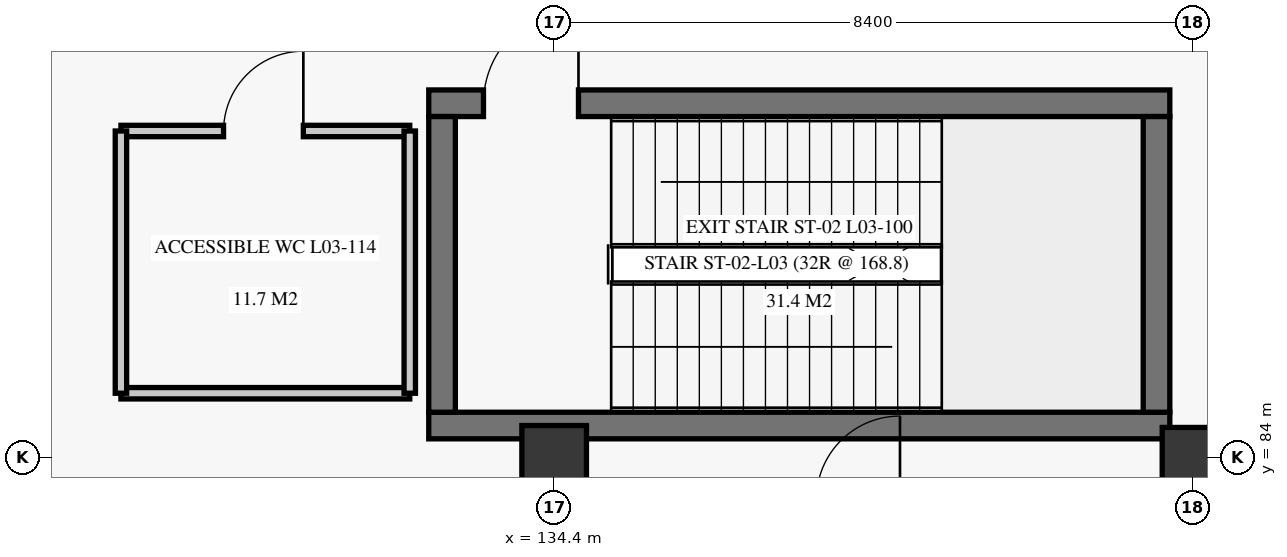
"""IFC4 building model, lengths in metres.
Left out: names, types, materials, properties, quantities, classifications, styles, units other than length and angle.
Written with IfcOpenShell. Run it as: python <this file> out.ifc"""

import sys

from ifc_helpers import new_model, si_unit, direction, frame, frame_2d, origin, origin_2d, place, context, subcontext, project, spatial, rectangle, extrude, element, fill, save


model = new_model("IFC4")
c1 = context("Model", 3, precision=1e-05, world=origin(), true_north=direction((0.0, 1.0)))
c2 = subcontext(c1, "Body", "Model", "MODEL_VIEW")
j1 = project(units=[si_unit("LENGTHUNIT", "METRE"), si_unit("PLANEANGLEUNIT", "RADIAN")], contexts=[c1])
p1 = place(None, origin())
s1 = spatial("IfcSite", under=j1, at=p1, CompositionType="ELEMENT")
p2 = place(p1, origin())
s2 = spatial("IfcBuilding", under=s1, at=p2, CompositionType="ELEMENT")
p3 = place(p2, frame((0.0, 0.0, 11.4)))
s3 = spatial("IfcBuildingStorey", under=s2, at=p3, CompositionType="ELEMENT", Elevation=11.4)
p4 = place(p3, frame((134.4, 84.0, 0.0), z_axis=(0.0, 0.0, 1.0), x_axis=(1.0, 0.0, 0.0)))
e1 = element("IfcColumn", 1, at=p4, inside=s3, PredefinedType="COLUMN", context=c2, shape_type="SweptSolid", body=[
    extrude(rectangle(XDim=0.85, YDim=0.85, at=origin_2d()), origin(), (0.0, 0.0, 1.0), 5.1),
])
p5 = place(p3, frame((142.8, 84.0, 0.0), z_axis=(0.0, 0.0, 1.0), x_axis=(1.0, 0.0, 0.0)))
e2 = element("IfcColumn", 2, at=p5, inside=s3, PredefinedType="COLUMN", context=c2, shape_type="SweptSolid", body=[
    extrude(rectangle(XDim=0.8, YDim=0.8, at=origin_2d()), origin(), (0.0, 0.0, 1.0), 5.1),
])
p6 = place(p3, frame((132.75, 84.425, 0.0), z_axis=(0.0, 0.0, 1.0), x_axis=(1.0, 0.0, 0.0)))
e3 = element("IfcWall", 3, at=p6, inside=s3, PredefinedType="SHEAR", context=c2, shape_type="SweptSolid", body=[
    extrude(rectangle(XDim=9.75, YDim=0.35, at=frame_2d((4.875, 0.0))), origin(), (0.0, 0.0, 1.0), 5.1),
])
p7 = place(p3, frame((132.75, 88.665, 0.0), z_axis=(0.0, 0.0, 1.0), x_axis=(1.0, 0.0, 0.0)))
e4 = element("IfcWall", 4, at=p7, inside=s3, PredefinedType="SHEAR", context=c2, shape_type="SweptSolid", body=[
    extrude(rectangle(XDim=9.75, YDim=0.35, at=frame_2d((4.875, 0.0))), origin(), (0.0, 0.0, 1.0), 5.1),
])
p8 = place(p7, frame((0.72, 0.0, 0.0)))
e5 = element("IfcOpeningElement", 5, at=p8, cuts=e4, PredefinedType="OPENING", context=c2, shape_type="SweptSolid", body=[
    extrude(rectangle(XDim=1.25, YDim=2.2, at=frame_2d((0.625, 1.1))), frame((0.0, 0.185, 0.0), z_axis=(0.0, -1.0, 0.0), x_axis=(1.0, 0.0, 0.0)), (0.0, 0.0, 1.0), 0.37),
])
for number, where, z_axis, x_axis in (
    (6, (132.925, 84.6, 0.0), (0.0, 0.0, 1.0), (0.0, 1.0, 0.0)),
    (7, (142.325, 84.6, 0.0), (0.0, 0.0, 1.0), (0.0, 1.0, 0.0)),
):
    element("IfcWall", number, at=place(p3, frame(where, z_axis=z_axis, x_axis=x_axis)), inside=s3, PredefinedType="SHEAR", context=c2, shape_type="SweptSolid", body=[
        extrude(rectangle(XDim=3.89, YDim=0.35, at=frame_2d((1.945, 0.0))), origin(), (0.0, 0.0, 1.0), 5.1),
    ])
p9 = place(p3, frame((128.7, 88.3, 0.0), z_axis=(0.0, 0.0, 1.0), x_axis=(1.0, 0.0, 0.0)))
e8 = element("IfcWall", 8, at=p9, inside=s3, PredefinedType="PARTITIONING", context=c2, shape_type="SweptSolid", body=[
    extrude(rectangle(XDim=3.8, YDim=0.15, at=frame_2d((1.9, 0.0))), origin(), (0.0, 0.0, 1.0), 4.72),
])
p10 = place(p9, frame((1.35, 0.0, 0.0)))
e9 = element("IfcOpeningElement", 9, at=p10, cuts=e8, PredefinedType="OPENING", context=c2, shape_type="SweptSolid", body=[
    extrude(rectangle(XDim=1.05, YDim=2.15, at=frame_2d((0.525, 1.075))), frame((0.0, 0.085, 0.0), z_axis=(0.0, -1.0, 0.0), x_axis=(1.0, 0.0, 0.0)), (0.0, 0.0, 1.0), 0.17),
])
p11 = place(p3, frame((128.7, 84.85, 0.0), z_axis=(0.0, 0.0, 1.0), x_axis=(1.0, 0.0, 0.0)))
e10 = element("IfcWall", 10, at=p11, inside=s3, PredefinedType="PARTITIONING", context=c2, shape_type="SweptSolid", body=[
    extrude(rectangle(XDim=3.8, YDim=0.15, at=frame_2d((1.9, 0.0))), origin(), (0.0, 0.0, 1.0), 4.72),
])
for number, where, z_axis, x_axis in (
    (11, (128.7, 84.85, 0.0), (0.0, 0.0, 1.0), (0.0, 1.0, 0.0)),
    (12, (132.5, 84.85, 0.0), (0.0, 0.0, 1.0), (0.0, 1.0, 0.0)),
):
    element("IfcWall", number, at=place(p3, frame(where, z_axis=z_axis, x_axis=x_axis)), inside=s3, PredefinedType="PARTITIONING", context=c2, shape_type="SweptSolid", body=[
        extrude(rectangle(XDim=3.45, YDim=0.15, at=frame_2d((1.725, 0.0))), origin(), (0.0, 0.0, 1.0), 4.72),
    ])
p12 = place(p8, origin())
e13 = element("IfcDoor", 13, at=p12, inside=s3, OperationType="SINGLE_SWING_RIGHT", PredefinedType="DOOR", context=c2, shape_type="SweptSolid", body=[
    extrude(rectangle(XDim=1.25, YDim=2.2, at=frame_2d((0.625, 1.1))), frame((0.0, 0.025, 0.0), z_axis=(0.0, -1.0, 0.0), x_axis=(1.0, 0.0, 0.0)), (0.0, 0.0, 1.0), 0.05),
])
fill(e5, e13)
p13 = place(p10, origin())
e14 = element("IfcDoor", 14, at=p13, inside=s3, OperationType="SINGLE_SWING_RIGHT", PredefinedType="DOOR", context=c2, shape_type="SweptSolid", body=[
    extrude(rectangle(XDim=1.05, YDim=2.15, at=frame_2d((0.525, 1.075))), frame((0.0, 0.025, 0.0), z_axis=(0.0, -1.0, 0.0), x_axis=(1.0, 0.0, 0.0)), (0.0, 0.0, 1.0), 0.05),
])
fill(e9, e14)
save(model, sys.argv[1])
